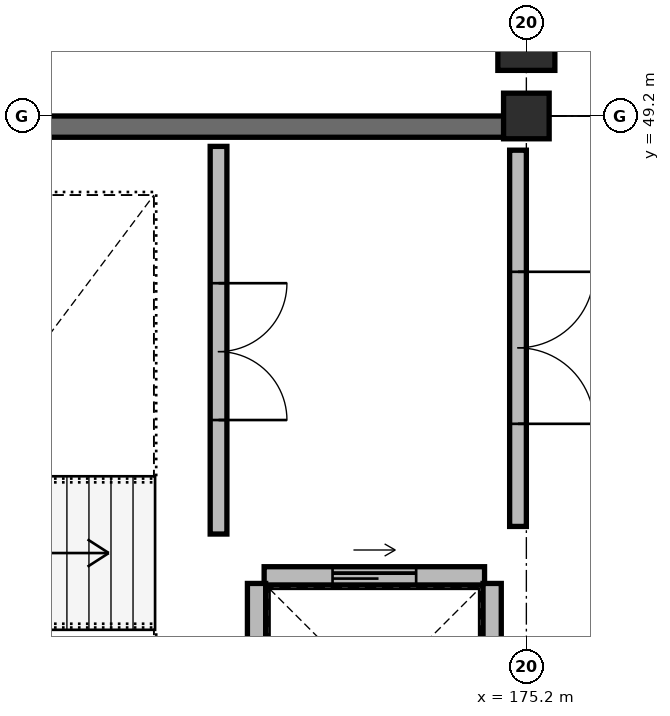
"""IFC4 building model, lengths in metres.
Left out: names, types, materials, properties, quantities, classifications, styles, units other than length and angle.
Written with IfcOpenShell. Run it as: python <this file> out.ifc"""

import sys

from ifc_helpers import new_model, si_unit, direction, frame, frame_2d, origin, origin_2d, place, context, subcontext, project, spatial, rectangle, extrude, element, fill, save


model = new_model("IFC4")
c1 = context("Model", 3, precision=1e-05, world=origin(), true_north=direction((0.0, 1.0)))
c2 = subcontext(c1, "Body", "Model", "MODEL_VIEW")
j1 = project(units=[si_unit("LENGTHUNIT", "METRE"), si_unit("PLANEANGLEUNIT", "RADIAN")], contexts=[c1])
p1 = place(None, origin())
s1 = spatial("IfcSite", under=j1, at=p1, CompositionType="ELEMENT")
p2 = place(p1, origin())
s2 = spatial("IfcBuilding", under=s1, at=p2, CompositionType="ELEMENT")
p3 = place(p2, frame((0.0, 0.0, 4.8)))
s3 = spatial("IfcBuildingStorey", under=s2, at=p3, CompositionType="ELEMENT", Elevation=4.8)
p4 = place(p3, frame((175.2, 50.4, 0.0), z_axis=(0.0, 0.0, 1.0), x_axis=(1.0, 0.0, 0.0)))
e1 = element("IfcColumn", 1, at=p4, inside=s3, PredefinedType="COLUMN", context=c2, shape_type="SweptSolid", body=[
    extrude(rectangle(XDim=0.75, YDim=1.2, at=origin_2d()), origin(), (0.0, 0.0, 1.0), 4.8),
])
p5 = place(p3, frame((175.2, 49.2, 0.0), z_axis=(0.0, 0.0, 1.0), x_axis=(1.0, 0.0, 0.0)))
e2 = element("IfcColumn", 2, at=p5, inside=s3, PredefinedType="COLUMN", context=c2, shape_type="SweptSolid", body=[
    extrude(rectangle(XDim=0.6, YDim=0.6, at=origin_2d()), origin(), (0.0, 0.0, 1.0), 4.8),
])
p6 = place(p3, frame((163.8, 49.06, 0.0), z_axis=(0.0, 0.0, 1.0), x_axis=(1.0, 0.0, 0.0)))
e3 = element("IfcWall", 3, at=p6, inside=s3, PredefinedType="SHEAR", context=c2, shape_type="SweptSolid", body=[
    extrude(rectangle(XDim=11.4, YDim=0.28, at=frame_2d((5.7, 0.0))), origin(), (0.0, 0.0, 1.0), 4.8),
])
p7 = place(p3, frame((171.15, 43.7, 0.0), z_axis=(0.0, 0.0, 1.0), x_axis=(0.0, 1.0, 0.0)))
e4 = element("IfcWall", 4, at=p7, inside=s3, PredefinedType="PARTITIONING", context=c2, shape_type="SweptSolid", body=[
    extrude(rectangle(XDim=5.1, YDim=0.22, at=frame_2d((2.55, 0.0))), origin(), (0.0, 0.0, 1.0), 4.505),
])
p8 = place(p7, frame((1.5, 0.0, 0.0)))
e5 = element("IfcOpeningElement", 5, at=p8, cuts=e4, PredefinedType="OPENING", context=c2, shape_type="SweptSolid", body=[
    extrude(rectangle(XDim=1.8, YDim=2.2, at=frame_2d((0.9, 1.1))), frame((0.0, 0.12, 0.0), z_axis=(0.0, -1.0, 0.0), x_axis=(1.0, 0.0, 0.0)), (0.0, 0.0, 1.0), 0.24),
])
p9 = place(p3, frame((171.75, 43.15, 0.0), z_axis=(0.0, 0.0, 1.0), x_axis=(1.0, 0.0, 0.0)))
e6 = element("IfcWall", 6, at=p9, inside=s3, PredefinedType="SOLIDWALL", context=c2, shape_type="SweptSolid", body=[
    extrude(rectangle(XDim=2.9, YDim=0.24, at=frame_2d((1.45, 0.0))), origin(), (0.0, 0.0, 1.0), 4.505),
])
p10 = place(p9, frame((0.9, 0.0, 0.0)))
e7 = element("IfcOpeningElement", 7, at=p10, cuts=e6, PredefinedType="OPENING", context=c2, shape_type="SweptSolid", body=[
    extrude(rectangle(XDim=1.1, YDim=2.15, at=frame_2d((0.55, 1.075))), frame((0.0, 0.13, 0.0), z_axis=(0.0, -1.0, 0.0), x_axis=(1.0, 0.0, 0.0)), (0.0, 0.0, 1.0), 0.26),
])
for number, where, z_axis, x_axis in (
    (8, (171.65, 40.05, 0.0), (0.0, 0.0, 1.0), (0.0, 1.0, 0.0)),
    (9, (174.75, 40.05, 0.0), (0.0, 0.0, 1.0), (0.0, 1.0, 0.0)),
):
    element("IfcWall", number, at=place(p3, frame(where, z_axis=z_axis, x_axis=x_axis)), inside=s3, PredefinedType="SOLIDWALL", context=c2, shape_type="SweptSolid", body=[
        extrude(rectangle(XDim=3.0, YDim=0.24, at=frame_2d((1.5, 0.0))), origin(), (0.0, 0.0, 1.0), 4.505),
    ])
p11 = place(p3, frame((175.09, 43.8, 0.0), z_axis=(0.0, 0.0, 1.0), x_axis=(0.0, 1.0, 0.0)))
e10 = element("IfcWall", 10, at=p11, inside=s3, PredefinedType="PARTITIONING", context=c2, shape_type="SweptSolid", body=[
    extrude(rectangle(XDim=4.95, YDim=0.22, at=frame_2d((2.475, 0.0))), origin(), (0.0, 0.0, 1.0), 3.925),
])
p12 = place(p11, frame((1.35, 0.0, 0.0)))
e11 = element("IfcOpeningElement", 11, at=p12, cuts=e10, PredefinedType="OPENING", context=c2, shape_type="SweptSolid", body=[
    extrude(rectangle(XDim=2.0, YDim=2.2, at=frame_2d((1.0, 1.1))), frame((0.0, 0.12, 0.0), z_axis=(0.0, -1.0, 0.0), x_axis=(1.0, 0.0, 0.0)), (0.0, 0.0, 1.0), 0.24),
])
p13 = place(p8, origin())
e12 = element("IfcDoor", 12, at=p13, inside=s3, OperationType="DOUBLE_DOOR_SINGLE_SWING", PredefinedType="DOOR", context=c2, shape_type="SweptSolid", body=[
    extrude(rectangle(XDim=1.8, YDim=2.2, at=frame_2d((0.9, 1.1))), frame((0.0, 0.025, 0.0), z_axis=(0.0, -1.0, 0.0), x_axis=(1.0, 0.0, 0.0)), (0.0, 0.0, 1.0), 0.05),
])
fill(e5, e12)
p14 = place(p10, origin())
e13 = element("IfcDoor", 13, at=p14, inside=s3, OperationType="DOUBLE_DOOR_SLIDING", PredefinedType="DOOR", context=c2, shape_type="SweptSolid", body=[
    extrude(rectangle(XDim=1.1, YDim=2.15, at=frame_2d((0.55, 1.075))), frame((0.0, 0.025, 0.0), z_axis=(0.0, -1.0, 0.0), x_axis=(1.0, 0.0, 0.0)), (0.0, 0.0, 1.0), 0.05),
])
fill(e7, e13)
p15 = place(p12, origin())
e14 = element("IfcDoor", 14, at=p15, inside=s3, OperationType="DOUBLE_DOOR_SINGLE_SWING", PredefinedType="DOOR", context=c2, shape_type="SweptSolid", body=[
    extrude(rectangle(XDim=2.0, YDim=2.2, at=frame_2d((1.0, 1.1))), frame((0.0, 0.025, 0.0), z_axis=(0.0, -1.0, 0.0), x_axis=(1.0, 0.0, 0.0)), (0.0, 0.0, 1.0), 0.05),
])
fill(e11, e14)
save(model, sys.argv[1])
